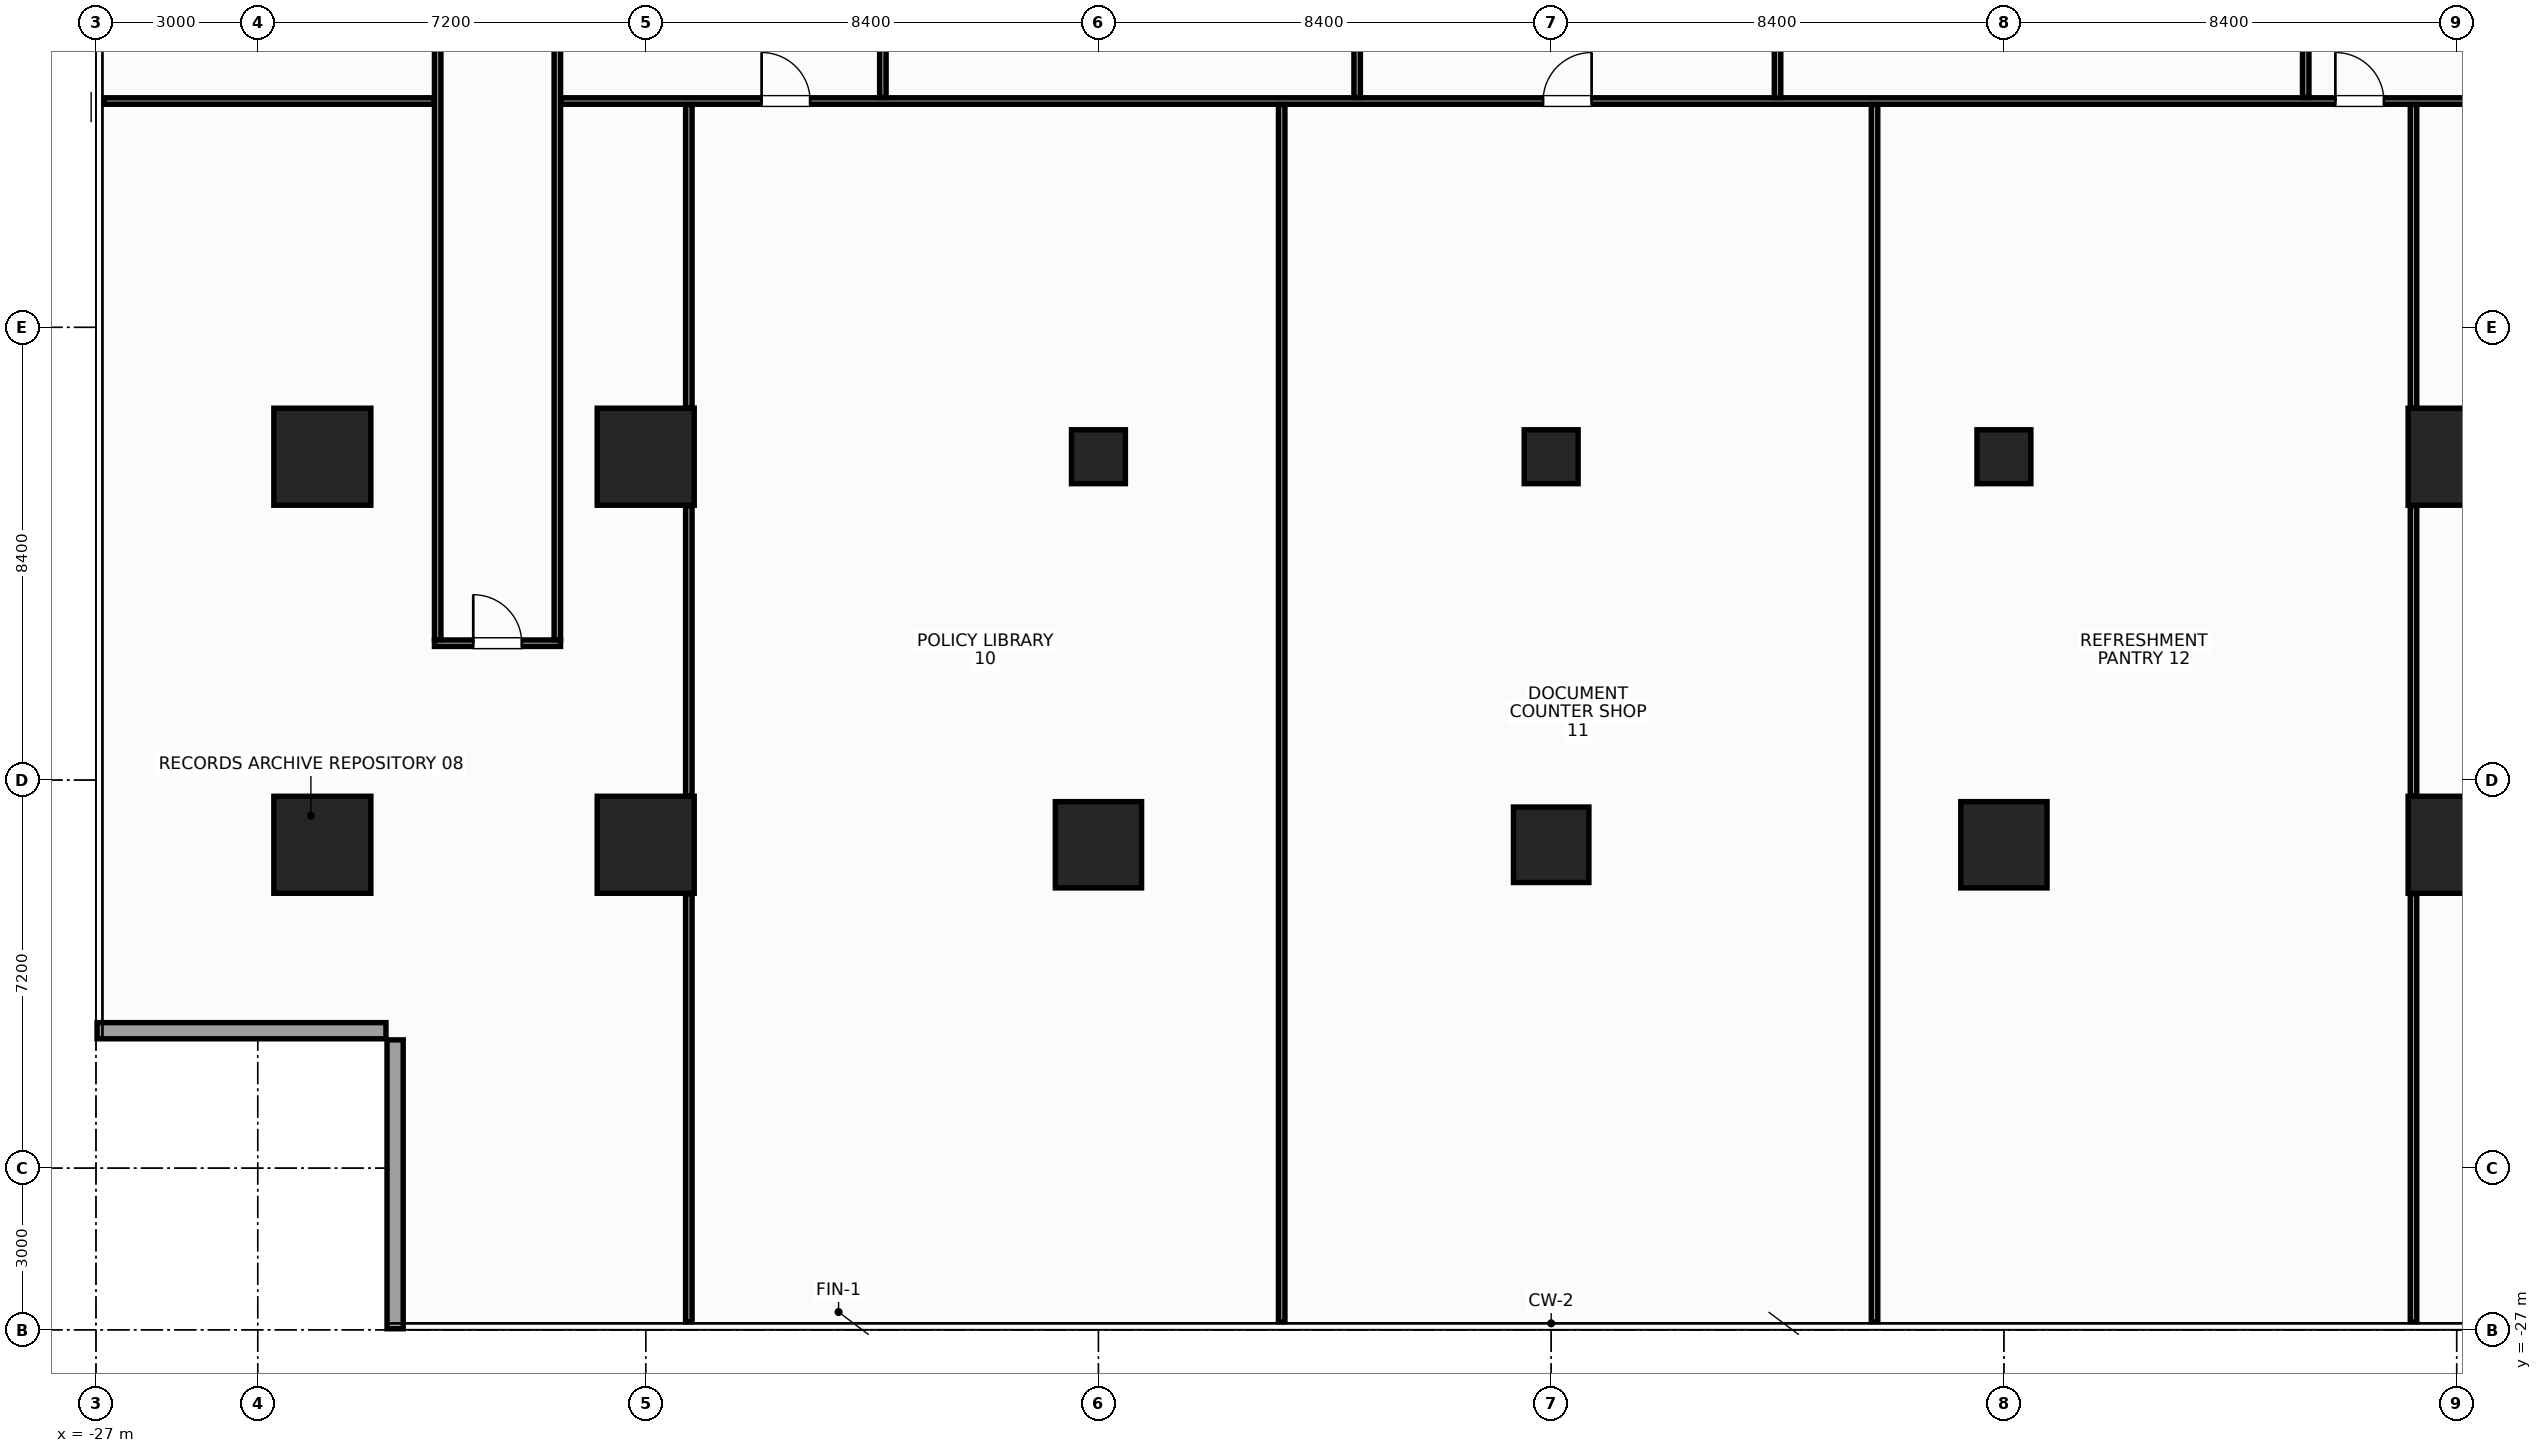
"""IFC4 building model, lengths in metres.
Left out: names, types, materials, properties, quantities, classifications, styles, units other than length and angle.
Written with IfcOpenShell. Run it as: python <this file> out.ifc"""

import sys

from ifc_helpers import new_model, si_unit, direction, frame, frame_2d, origin, origin_2d, place, context, subcontext, project, spatial, rectangle, hollow_rectangle, extrude, source, transform, mapped, element, fill, save


model = new_model("IFC4")
c1 = context("Model", 3, precision=1e-05, world=origin(), true_north=direction((0.0, 1.0)))
c2 = subcontext(c1, "Body", "Model", "MODEL_VIEW")
j1 = project(units=[si_unit("LENGTHUNIT", "METRE"), si_unit("PLANEANGLEUNIT", "RADIAN")], contexts=[c1])
p1 = place(None, origin())
s1 = spatial("IfcSite", under=j1, at=p1, CompositionType="ELEMENT")
p2 = place(p1, origin())
s2 = spatial("IfcBuilding", under=s1, at=p2, CompositionType="ELEMENT")
p3 = place(p2, frame((0.0, 0.0, 30.8)))
s3 = spatial("IfcBuildingStorey", under=s2, at=p3, CompositionType="ELEMENT", Elevation=30.8)
m1 = source(origin(), c2, "Body", "SweptSolid", [
    extrude(rectangle(XDim=1.8, YDim=1.8, at=origin_2d()), origin(), (0.0, 0.0, 1.0), 3.6),
])
for number, where, z_axis, x_axis in (
    (1, (-16.8, -18.0, 0.0), (0.0, 0.0, 1.0), (1.0, 0.0, 0.0)),
    (2, (-16.8, -10.8, 0.0), (0.0, 0.0, 1.0), (1.0, 0.0, 0.0)),
    (3, (16.8, -18.0, 0.0), (0.0, 0.0, 1.0), (1.0, 0.0, 0.0)),
    (4, (16.8, -10.8, 0.0), (0.0, 0.0, 1.0), (1.0, 0.0, 0.0)),
    (5, (-22.8, -18.0, 0.0), (0.0, 0.0, 1.0), (1.0, 0.0, 0.0)),
    (6, (-22.8, -10.8, 0.0), (0.0, 0.0, 1.0), (1.0, 0.0, 0.0)),
):
    element("IfcColumn", number, at=place(p3, frame(where, z_axis=z_axis, x_axis=x_axis)), inside=s3, PredefinedType="COLUMN", context=c2, shape_type="MappedRepresentation", body=[
        mapped(m1, transform((0.0, 0.0, 0.0), x_axis=(1.0, 0.0, 0.0), y_axis=(0.0, 1.0, 0.0), z_axis=(0.0, 0.0, 1.0), scale=1.0)),
    ])
m2 = source(origin(), c2, "Body", "SweptSolid", [
    extrude(rectangle(XDim=1.6, YDim=1.6, at=origin_2d()), origin(), (0.0, 0.0, 1.0), 3.6),
])
p4 = place(p3, frame((-8.4, -18.0, 0.0), z_axis=(0.0, 0.0, 1.0), x_axis=(1.0, 0.0, 0.0)))
e7 = element("IfcColumn", 7, at=p4, inside=s3, PredefinedType="COLUMN", context=c2, shape_type="MappedRepresentation", body=[
    mapped(m2, transform((0.0, 0.0, 0.0), x_axis=(1.0, 0.0, 0.0), y_axis=(0.0, 1.0, 0.0), z_axis=(0.0, 0.0, 1.0), scale=1.0)),
])
m3 = source(origin(), c2, "Body", "SweptSolid", [
    extrude(hollow_rectangle(XDim=1.0, YDim=1.0, WallThickness=0.045, at=origin_2d()), origin(), (0.0, 0.0, 1.0), 3.6),
])
p5 = place(p3, frame((-8.4, -10.8, 0.0), z_axis=(0.0, 0.0, 1.0), x_axis=(1.0, 0.0, 0.0)))
e8 = element("IfcColumn", 8, at=p5, inside=s3, PredefinedType="COLUMN", context=c2, shape_type="MappedRepresentation", body=[
    mapped(m3, transform((0.0, 0.0, 0.0), x_axis=(1.0, 0.0, 0.0), y_axis=(0.0, 1.0, 0.0), z_axis=(0.0, 0.0, 1.0), scale=1.0)),
])
p6 = place(p3, frame((8.4, -18.0, 0.0), z_axis=(0.0, 0.0, 1.0), x_axis=(1.0, 0.0, 0.0)))
e9 = element("IfcColumn", 9, at=p6, inside=s3, PredefinedType="COLUMN", context=c2, shape_type="MappedRepresentation", body=[
    mapped(m2, transform((0.0, 0.0, 0.0), x_axis=(1.0, 0.0, 0.0), y_axis=(0.0, 1.0, 0.0), z_axis=(0.0, 0.0, 1.0), scale=1.0)),
])
p7 = place(p3, frame((8.4, -10.8, 0.0), z_axis=(0.0, 0.0, 1.0), x_axis=(1.0, 0.0, 0.0)))
e10 = element("IfcColumn", 10, at=p7, inside=s3, PredefinedType="COLUMN", context=c2, shape_type="MappedRepresentation", body=[
    mapped(m3, transform((0.0, 0.0, 0.0), x_axis=(1.0, 0.0, 0.0), y_axis=(0.0, 1.0, 0.0), z_axis=(0.0, 0.0, 1.0), scale=1.0)),
])
m4 = source(origin(), c2, "Body", "SweptSolid", [
    extrude(rectangle(XDim=1.4, YDim=1.4, at=origin_2d()), origin(), (0.0, 0.0, 1.0), 3.6),
])
p8 = place(p3, frame((0.0, -18.0, 0.0), z_axis=(0.0, 0.0, 1.0), x_axis=(1.0, 0.0, 0.0)))
e11 = element("IfcColumn", 11, at=p8, inside=s3, PredefinedType="COLUMN", context=c2, shape_type="MappedRepresentation", body=[
    mapped(m4, transform((0.0, 0.0, 0.0), x_axis=(1.0, 0.0, 0.0), y_axis=(0.0, 1.0, 0.0), z_axis=(0.0, 0.0, 1.0), scale=1.0)),
])
m5 = source(origin(), c2, "Body", "SweptSolid", [
    extrude(rectangle(XDim=1.0, YDim=1.0, at=origin_2d()), origin(), (0.0, 0.0, 1.0), 3.6),
])
p9 = place(p3, frame((0.0, -10.8, 0.0), z_axis=(0.0, 0.0, 1.0), x_axis=(1.0, 0.0, 0.0)))
e12 = element("IfcColumn", 12, at=p9, inside=s3, PredefinedType="COLUMN", context=c2, shape_type="MappedRepresentation", body=[
    mapped(m5, transform((0.0, 0.0, 0.0), x_axis=(1.0, 0.0, 0.0), y_axis=(0.0, 1.0, 0.0), z_axis=(0.0, 0.0, 1.0), scale=1.0)),
])
m6 = source(origin(), c2, "Body", "SweptSolid", [
    extrude(rectangle(XDim=5.36, YDim=0.3, at=frame_2d((2.68, 0.0))), origin(), (0.0, 0.0, 1.0), 2.74),
])
for number, where, z_axis, x_axis in (
    (13, (-26.98, -21.45, 0.0), (0.0, 0.0, 1.0), (1.0, 0.0, 0.0)),
    (14, (-21.45, -21.62, 0.0), (0.0, 0.0, 1.0), (0.0, -1.0, 0.0)),
):
    element("IfcWall", number, at=place(p3, frame(where, z_axis=z_axis, x_axis=x_axis)), inside=s3, PredefinedType="STANDARD", context=c2, shape_type="MappedRepresentation", body=[
        mapped(m6, transform((0.0, 0.0, 0.0), x_axis=(1.0, 0.0, 0.0), y_axis=(0.0, 1.0, 0.0), z_axis=(0.0, 0.0, 1.0), scale=1.0)),
    ])
m7 = source(origin(), c2, "Body", "SweptSolid", [
    extrude(rectangle(XDim=2.34, YDim=0.12, at=frame_2d((1.17, 0.0))), origin(), (0.0, 0.0, 1.0), 2.985),
])
p10 = place(p3, frame((-20.72, -14.26, 0.0), z_axis=(0.0, 0.0, 1.0), x_axis=(1.0, 0.0, 0.0)))
e15 = element("IfcWall", 15, at=p10, inside=s3, PredefinedType="PARTITIONING", context=c2, shape_type="MappedRepresentation", body=[
    mapped(m7, transform((0.0, 0.0, 0.0), x_axis=(1.0, 0.0, 0.0), y_axis=(0.0, 1.0, 0.0), z_axis=(0.0, 0.0, 1.0), scale=1.0)),
])
p11 = place(p10, frame((0.72, 0.0, 0.0)))
e16 = element("IfcOpeningElement", 16, at=p11, cuts=e15, PredefinedType="OPENING", context=c2, shape_type="SweptSolid", body=[
    extrude(rectangle(XDim=0.9, YDim=2.15, at=frame_2d((0.45, 1.075))), frame((0.0, 0.072, 0.0), z_axis=(0.0, -1.0, 0.0), x_axis=(1.0, 0.0, 0.0)), (0.0, 0.0, 1.0), 0.144),
])
m8 = source(origin(), c2, "Body", "SweptSolid", [
    extrude(rectangle(XDim=24.13, YDim=0.12, at=frame_2d((12.065, 0.0))), origin(), (0.0, 0.0, 1.0), 2.745),
])
p12 = place(p3, frame((-20.66, -14.195, 0.0), z_axis=(0.0, 0.0, 1.0), x_axis=(0.0, 1.0, 0.0)))
e17 = element("IfcWall", 17, at=p12, inside=s3, PredefinedType="PARTITIONING", context=c2, shape_type="MappedRepresentation", body=[
    mapped(m8, transform((0.0, 0.0, 0.0), x_axis=(1.0, 0.0, 0.0), y_axis=(0.0, 1.0, 0.0), z_axis=(0.0, 0.0, 1.0), scale=1.0)),
])
p13 = place(p12, frame((16.583, 0.0, 0.0)))
e18 = element("IfcOpeningElement", 18, at=p13, cuts=e17, PredefinedType="OPENING", context=c2, shape_type="SweptSolid", body=[
    extrude(rectangle(XDim=0.9, YDim=2.15, at=frame_2d((0.45, 1.075))), frame((0.0, 0.072, 0.0), z_axis=(0.0, -1.0, 0.0), x_axis=(1.0, 0.0, 0.0)), (0.0, 0.0, 1.0), 0.144),
])
m9 = source(origin(), c2, "Body", "SweptSolid", [
    extrude(rectangle(XDim=21.995, YDim=0.12, at=frame_2d((10.998, 0.0))), origin(), (0.0, 0.0, 1.0), 2.745),
])
p14 = place(p3, frame((-18.44, -14.195, 0.0), z_axis=(0.0, 0.0, 1.0), x_axis=(0.0, 1.0, 0.0)))
e19 = element("IfcWall", 19, at=p14, inside=s3, PredefinedType="PARTITIONING", context=c2, shape_type="MappedRepresentation", body=[
    mapped(m9, transform((0.0, 0.0, 0.0), x_axis=(1.0, 0.0, 0.0), y_axis=(0.0, 1.0, 0.0), z_axis=(0.0, 0.0, 1.0), scale=1.0)),
])
m10 = source(origin(), c2, "Body", "SweptSolid", [
    extrude(rectangle(XDim=6.125, YDim=0.12, at=frame_2d((3.062, 0.0))), origin(), (0.0, 0.0, 1.0), 2.745),
])
p15 = place(p3, frame((-26.85, -4.2, 0.0), z_axis=(0.0, 0.0, 1.0), x_axis=(1.0, 0.0, 0.0)))
e20 = element("IfcWall", 20, at=p15, inside=s3, PredefinedType="PARTITIONING", context=c2, shape_type="MappedRepresentation", body=[
    mapped(m10, transform((0.0, 0.0, 0.0), x_axis=(1.0, 0.0, 0.0), y_axis=(0.0, 1.0, 0.0), z_axis=(0.0, 0.0, 1.0), scale=1.0)),
])
m11 = source(origin(), c2, "Body", "SweptSolid", [
    extrude(rectangle(XDim=36.75, YDim=0.12, at=frame_2d((18.375, 0.0))), origin(), (0.0, 0.0, 1.0), 2.745),
])
p16 = place(p3, frame((-18.375, -4.2, 0.0), z_axis=(0.0, 0.0, 1.0), x_axis=(1.0, 0.0, 0.0)))
e21 = element("IfcWall", 21, at=p16, inside=s3, PredefinedType="PARTITIONING", context=c2, shape_type="MappedRepresentation", body=[
    mapped(m11, transform((0.0, 0.0, 0.0), x_axis=(1.0, 0.0, 0.0), y_axis=(0.0, 1.0, 0.0), z_axis=(0.0, 0.0, 1.0), scale=1.0)),
])
p17 = place(p16, frame((3.725, 0.0, 0.0)))
e22 = element("IfcOpeningElement", 22, at=p17, cuts=e21, PredefinedType="OPENING", context=c2, shape_type="SweptSolid", body=[
    extrude(rectangle(XDim=0.9, YDim=2.15, at=frame_2d((0.45, 1.075))), frame((0.0, 0.072, 0.0), z_axis=(0.0, -1.0, 0.0), x_axis=(1.0, 0.0, 0.0)), (0.0, 0.0, 1.0), 0.144),
])
p18 = place(p16, frame((18.225, 0.0, 0.0)))
e23 = element("IfcOpeningElement", 23, at=p18, cuts=e21, PredefinedType="OPENING", context=c2, shape_type="SweptSolid", body=[
    extrude(rectangle(XDim=0.9, YDim=2.15, at=frame_2d((0.45, 1.075))), frame((0.0, 0.072, 0.0), z_axis=(0.0, -1.0, 0.0), x_axis=(1.0, 0.0, 0.0)), (0.0, 0.0, 1.0), 0.144),
])
p19 = place(p16, frame((32.925, 0.0, 0.0)))
e24 = element("IfcOpeningElement", 24, at=p19, cuts=e21, PredefinedType="OPENING", context=c2, shape_type="SweptSolid", body=[
    extrude(rectangle(XDim=0.9, YDim=2.15, at=frame_2d((0.45, 1.075))), frame((0.0, 0.072, 0.0), z_axis=(0.0, -1.0, 0.0), x_axis=(1.0, 0.0, 0.0)), (0.0, 0.0, 1.0), 0.144),
])
m12 = source(origin(), c2, "Body", "SweptSolid", [
    extrude(rectangle(XDim=11.81, YDim=0.12, at=frame_2d((5.905, 0.0))), origin(), (0.0, 0.0, 1.0), 2.301),
])
for number, where, z_axis, x_axis in (
    (25, (-12.4, -4.135, 0.0), (0.0, 0.0, 1.0), (0.0, 1.0, 0.0)),
    (26, (-3.6, -4.135, 0.0), (0.0, 0.0, 1.0), (0.0, 1.0, 0.0)),
    (27, (4.2, -4.135, 0.0), (0.0, 0.0, 1.0), (0.0, 1.0, 0.0)),
    (28, (14.0, -4.135, 0.0), (0.0, 0.0, 1.0), (0.0, 1.0, 0.0)),
):
    element("IfcWall", number, at=place(p3, frame(where, z_axis=z_axis, x_axis=x_axis)), inside=s3, PredefinedType="PARTITIONING", context=c2, shape_type="MappedRepresentation", body=[
        mapped(m12, transform((0.0, 0.0, 0.0), x_axis=(1.0, 0.0, 0.0), y_axis=(0.0, 1.0, 0.0), z_axis=(0.0, 0.0, 1.0), scale=1.0)),
    ])
m13 = source(origin(), c2, "Body", "SweptSolid", [
    extrude(rectangle(XDim=7.94, YDim=0.12, at=frame_2d((3.97, 0.0))), origin(), (0.0, 0.0, 1.0), 3.36),
])
p20 = place(p3, frame((-16.0, -26.85, 0.0), z_axis=(0.0, 0.0, 1.0), x_axis=(0.0, 1.0, 0.0)))
e29 = element("IfcWall", 29, at=p20, inside=s3, PredefinedType="PARTITIONING", context=c2, shape_type="MappedRepresentation", body=[
    mapped(m13, transform((0.0, 0.0, 0.0), x_axis=(1.0, 0.0, 0.0), y_axis=(0.0, 1.0, 0.0), z_axis=(0.0, 0.0, 1.0), scale=1.0)),
])
m14 = source(origin(), c2, "Body", "SweptSolid", [
    extrude(rectangle(XDim=5.38, YDim=0.12, at=frame_2d((2.69, 0.0))), origin(), (0.0, 0.0, 1.0), 3.36),
])
p21 = place(p3, frame((-16.0, -17.09, 0.0), z_axis=(0.0, 0.0, 1.0), x_axis=(0.0, 1.0, 0.0)))
e30 = element("IfcWall", 30, at=p21, inside=s3, PredefinedType="PARTITIONING", context=c2, shape_type="MappedRepresentation", body=[
    mapped(m14, transform((0.0, 0.0, 0.0), x_axis=(1.0, 0.0, 0.0), y_axis=(0.0, 1.0, 0.0), z_axis=(0.0, 0.0, 1.0), scale=1.0)),
])
m15 = source(origin(), c2, "Body", "SweptSolid", [
    extrude(rectangle(XDim=5.625, YDim=0.12, at=frame_2d((2.812, 0.0))), origin(), (0.0, 0.0, 1.0), 3.36),
])
p22 = place(p3, frame((-16.0, -9.89, 0.0), z_axis=(0.0, 0.0, 1.0), x_axis=(0.0, 1.0, 0.0)))
e31 = element("IfcWall", 31, at=p22, inside=s3, PredefinedType="PARTITIONING", context=c2, shape_type="MappedRepresentation", body=[
    mapped(m15, transform((0.0, 0.0, 0.0), x_axis=(1.0, 0.0, 0.0), y_axis=(0.0, 1.0, 0.0), z_axis=(0.0, 0.0, 1.0), scale=1.0)),
])
m16 = source(origin(), c2, "Body", "SweptSolid", [
    extrude(rectangle(XDim=22.585, YDim=0.12, at=frame_2d((11.292, 0.0))), origin(), (0.0, 0.0, 1.0), 2.745),
])
for number, where, z_axis, x_axis in (
    (32, (-5.0, -26.85, 0.0), (0.0, 0.0, 1.0), (0.0, 1.0, 0.0)),
    (33, (6.0, -26.85, 0.0), (0.0, 0.0, 1.0), (0.0, 1.0, 0.0)),
):
    element("IfcWall", number, at=place(p3, frame(where, z_axis=z_axis, x_axis=x_axis)), inside=s3, PredefinedType="PARTITIONING", context=c2, shape_type="MappedRepresentation", body=[
        mapped(m16, transform((0.0, 0.0, 0.0), x_axis=(1.0, 0.0, 0.0), y_axis=(0.0, 1.0, 0.0), z_axis=(0.0, 0.0, 1.0), scale=1.0)),
    ])
p23 = place(p3, frame((16.0, -26.85, 0.0), z_axis=(0.0, 0.0, 1.0), x_axis=(0.0, 1.0, 0.0)))
e34 = element("IfcWall", 34, at=p23, inside=s3, PredefinedType="PARTITIONING", context=c2, shape_type="MappedRepresentation", body=[
    mapped(m13, transform((0.0, 0.0, 0.0), x_axis=(1.0, 0.0, 0.0), y_axis=(0.0, 1.0, 0.0), z_axis=(0.0, 0.0, 1.0), scale=1.0)),
])
p24 = place(p3, frame((16.0, -17.09, 0.0), z_axis=(0.0, 0.0, 1.0), x_axis=(0.0, 1.0, 0.0)))
e35 = element("IfcWall", 35, at=p24, inside=s3, PredefinedType="PARTITIONING", context=c2, shape_type="MappedRepresentation", body=[
    mapped(m14, transform((0.0, 0.0, 0.0), x_axis=(1.0, 0.0, 0.0), y_axis=(0.0, 1.0, 0.0), z_axis=(0.0, 0.0, 1.0), scale=1.0)),
])
p25 = place(p3, frame((16.0, -9.89, 0.0), z_axis=(0.0, 0.0, 1.0), x_axis=(0.0, 1.0, 0.0)))
e36 = element("IfcWall", 36, at=p25, inside=s3, PredefinedType="PARTITIONING", context=c2, shape_type="MappedRepresentation", body=[
    mapped(m15, transform((0.0, 0.0, 0.0), x_axis=(1.0, 0.0, 0.0), y_axis=(0.0, 1.0, 0.0), z_axis=(0.0, 0.0, 1.0), scale=1.0)),
])
m17 = source(origin(), c2, "Body", "SweptSolid", [
    extrude(rectangle(XDim=0.9, YDim=2.15, at=frame_2d((0.45, 1.075))), frame((0.0, 0.025, 0.0), z_axis=(0.0, -1.0, 0.0), x_axis=(1.0, 0.0, 0.0)), (0.0, 0.0, 1.0), 0.05),
])
p26 = place(p11, origin())
e37 = element("IfcDoor", 37, at=p26, inside=s3, OperationType="SINGLE_SWING_LEFT", PredefinedType="DOOR", context=c2, shape_type="MappedRepresentation", body=[
    mapped(m17, transform((0.0, 0.0, 0.0), x_axis=(1.0, 0.0, 0.0), y_axis=(0.0, 1.0, 0.0), z_axis=(0.0, 0.0, 1.0), scale=1.0)),
])
fill(e16, e37)
p27 = place(p17, origin())
e38 = element("IfcDoor", 38, at=p27, inside=s3, OperationType="SINGLE_SWING_LEFT", PredefinedType="DOOR", context=c2, shape_type="MappedRepresentation", body=[
    mapped(m17, transform((0.0, 0.0, 0.0), x_axis=(1.0, 0.0, 0.0), y_axis=(0.0, 1.0, 0.0), z_axis=(0.0, 0.0, 1.0), scale=1.0)),
])
fill(e22, e38)
p28 = place(p18, origin())
e39 = element("IfcDoor", 39, at=p28, inside=s3, OperationType="SINGLE_SWING_RIGHT", PredefinedType="DOOR", context=c2, shape_type="MappedRepresentation", body=[
    mapped(m17, transform((0.0, 0.0, 0.0), x_axis=(1.0, 0.0, 0.0), y_axis=(0.0, 1.0, 0.0), z_axis=(0.0, 0.0, 1.0), scale=1.0)),
])
fill(e23, e39)
p29 = place(p19, origin())
e40 = element("IfcDoor", 40, at=p29, inside=s3, OperationType="SINGLE_SWING_LEFT", PredefinedType="DOOR", context=c2, shape_type="MappedRepresentation", body=[
    mapped(m17, transform((0.0, 0.0, 0.0), x_axis=(1.0, 0.0, 0.0), y_axis=(0.0, 1.0, 0.0), z_axis=(0.0, 0.0, 1.0), scale=1.0)),
])
fill(e24, e40)
save(model, sys.argv[1])
